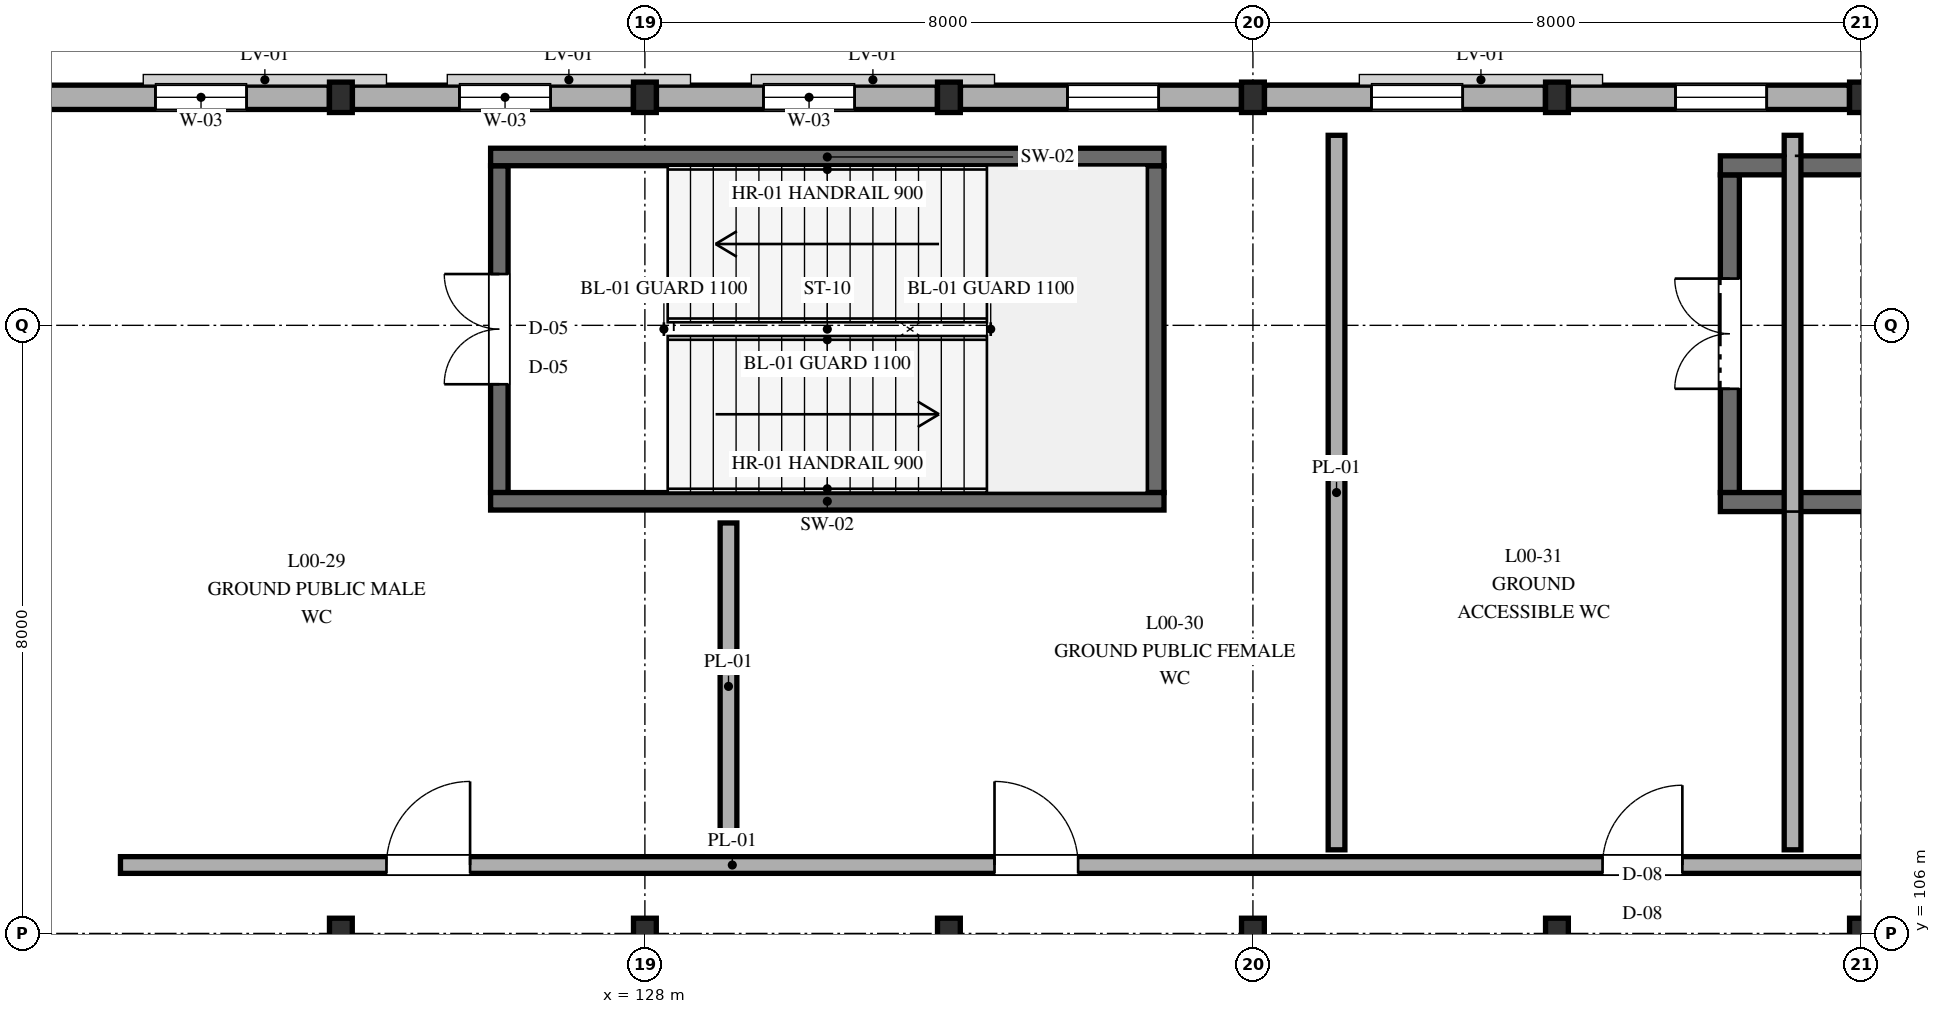
"""IFC4 building model, lengths in metres.
Left out: names, types, materials, properties, quantities, classifications, styles, units other than length and angle.
Written with IfcOpenShell. Run it as: python <this file> out.ifc"""

import sys

from ifc_helpers import new_model, si_unit, direction, frame, frame_2d, origin, origin_2d, place, context, subcontext, project, spatial, rectangle, i_section, extrude, element, fill, save


model = new_model("IFC4")
c1 = context("Model", 3, precision=1e-05, world=origin(), true_north=direction((0.0, 1.0)))
c2 = subcontext(c1, "Body", "Model", "MODEL_VIEW")
j1 = project(units=[si_unit("LENGTHUNIT", "METRE"), si_unit("PLANEANGLEUNIT", "RADIAN")], contexts=[c1])
p1 = place(None, origin())
s1 = spatial("IfcSite", under=j1, at=p1, CompositionType="ELEMENT")
p2 = place(p1, origin())
s2 = spatial("IfcBuilding", under=s1, at=p2, CompositionType="ELEMENT")
p3 = place(p2, origin())
s3 = spatial("IfcBuildingStorey", under=s2, at=p3, CompositionType="ELEMENT", Elevation=0.0)
for number, where, z_axis, x_axis in (
    (1, (124.0, 106.0, 0.0), (0.0, 0.0, 1.0), (1.0, 0.0, 0.0)),
    (2, (124.0, 117.0, 0.0), (0.0, 0.0, 1.0), (1.0, 0.0, 0.0)),
    (3, (128.0, 106.0, 0.0), (0.0, 0.0, 1.0), (1.0, 0.0, 0.0)),
    (4, (128.0, 117.0, 0.0), (0.0, 0.0, 1.0), (1.0, 0.0, 0.0)),
    (5, (132.0, 106.0, 0.0), (0.0, 0.0, 1.0), (1.0, 0.0, 0.0)),
    (6, (132.0, 117.0, 0.0), (0.0, 0.0, 1.0), (1.0, 0.0, 0.0)),
    (7, (136.0, 106.0, 0.0), (0.0, 0.0, 1.0), (1.0, 0.0, 0.0)),
    (8, (136.0, 117.0, 0.0), (0.0, 0.0, 1.0), (1.0, 0.0, 0.0)),
    (9, (140.0, 106.0, 0.0), (0.0, 0.0, 1.0), (1.0, 0.0, 0.0)),
    (10, (140.0, 117.0, 0.0), (0.0, 0.0, 1.0), (1.0, 0.0, 0.0)),
    (11, (144.0, 106.0, 0.0), (0.0, 0.0, 1.0), (1.0, 0.0, 0.0)),
    (12, (144.0, 117.0, 0.0), (0.0, 0.0, 1.0), (1.0, 0.0, 0.0)),
):
    element("IfcColumn", number, at=place(p3, frame(where, z_axis=z_axis, x_axis=x_axis)), inside=s3, PredefinedType="COLUMN", context=c2, shape_type="SweptSolid", body=[
        extrude(i_section(OverallWidth=0.3, OverallDepth=0.4, WebThickness=0.013, FlangeThickness=0.024, FilletRadius=0.027, at=origin_2d()), origin(), (0.0, 0.0, 1.0), 4.8),
    ])
p4 = place(p3, frame((123.848, 117.0, 0.0), z_axis=(0.0, 0.0, 1.0), x_axis=(-1.0, 0.0, 0.0)))
e13 = element("IfcWall", 13, at=p4, inside=s3, PredefinedType="STANDARD", context=c2, shape_type="SweptSolid", body=[
    extrude(rectangle(XDim=3.696, YDim=0.32, at=frame_2d((1.848, 0.0))), origin(), (0.0, 0.0, 1.0), 4.255),
])
p5 = place(p4, frame((1.088, 0.0, 0.95)))
e14 = element("IfcOpeningElement", 14, at=p5, cuts=e13, PredefinedType="OPENING", context=c2, shape_type="SweptSolid", body=[
    extrude(rectangle(XDim=1.2, YDim=1.5, at=frame_2d((0.6, 0.75))), frame((0.0, 0.17, 0.0), z_axis=(0.0, -1.0, 0.0), x_axis=(1.0, 0.0, 0.0)), (0.0, 0.0, 1.0), 0.34),
])
p6 = place(p3, frame((127.848, 117.0, 0.0), z_axis=(0.0, 0.0, 1.0), x_axis=(-1.0, 0.0, 0.0)))
e15 = element("IfcWall", 15, at=p6, inside=s3, PredefinedType="STANDARD", context=c2, shape_type="SweptSolid", body=[
    extrude(rectangle(XDim=3.696, YDim=0.32, at=frame_2d((1.848, 0.0))), origin(), (0.0, 0.0, 1.0), 4.255),
])
p7 = place(p6, frame((1.088, 0.0, 0.95)))
e16 = element("IfcOpeningElement", 16, at=p7, cuts=e15, PredefinedType="OPENING", context=c2, shape_type="SweptSolid", body=[
    extrude(rectangle(XDim=1.2, YDim=1.5, at=frame_2d((0.6, 0.75))), frame((0.0, 0.17, 0.0), z_axis=(0.0, -1.0, 0.0), x_axis=(1.0, 0.0, 0.0)), (0.0, 0.0, 1.0), 0.34),
])
p8 = place(p3, frame((131.848, 117.0, 0.0), z_axis=(0.0, 0.0, 1.0), x_axis=(-1.0, 0.0, 0.0)))
e17 = element("IfcWall", 17, at=p8, inside=s3, PredefinedType="STANDARD", context=c2, shape_type="SweptSolid", body=[
    extrude(rectangle(XDim=3.696, YDim=0.32, at=frame_2d((1.848, 0.0))), origin(), (0.0, 0.0, 1.0), 4.255),
])
p9 = place(p8, frame((1.088, 0.0, 0.95)))
e18 = element("IfcOpeningElement", 18, at=p9, cuts=e17, PredefinedType="OPENING", context=c2, shape_type="SweptSolid", body=[
    extrude(rectangle(XDim=1.2, YDim=1.5, at=frame_2d((0.6, 0.75))), frame((0.0, 0.17, 0.0), z_axis=(0.0, -1.0, 0.0), x_axis=(1.0, 0.0, 0.0)), (0.0, 0.0, 1.0), 0.34),
])
p10 = place(p3, frame((135.848, 117.0, 0.0), z_axis=(0.0, 0.0, 1.0), x_axis=(-1.0, 0.0, 0.0)))
e19 = element("IfcWall", 19, at=p10, inside=s3, PredefinedType="STANDARD", context=c2, shape_type="SweptSolid", body=[
    extrude(rectangle(XDim=3.696, YDim=0.32, at=frame_2d((1.848, 0.0))), origin(), (0.0, 0.0, 1.0), 4.255),
])
p11 = place(p10, frame((1.088, 0.0, 0.95)))
e20 = element("IfcOpeningElement", 20, at=p11, cuts=e19, PredefinedType="OPENING", context=c2, shape_type="SweptSolid", body=[
    extrude(rectangle(XDim=1.2, YDim=1.5, at=frame_2d((0.6, 0.75))), frame((0.0, 0.17, 0.0), z_axis=(0.0, -1.0, 0.0), x_axis=(1.0, 0.0, 0.0)), (0.0, 0.0, 1.0), 0.34),
])
p12 = place(p3, frame((139.848, 117.0, 0.0), z_axis=(0.0, 0.0, 1.0), x_axis=(-1.0, 0.0, 0.0)))
e21 = element("IfcWall", 21, at=p12, inside=s3, PredefinedType="STANDARD", context=c2, shape_type="SweptSolid", body=[
    extrude(rectangle(XDim=3.696, YDim=0.32, at=frame_2d((1.848, 0.0))), origin(), (0.0, 0.0, 1.0), 4.255),
])
p13 = place(p12, frame((1.088, 0.0, 0.95)))
e22 = element("IfcOpeningElement", 22, at=p13, cuts=e21, PredefinedType="OPENING", context=c2, shape_type="SweptSolid", body=[
    extrude(rectangle(XDim=1.2, YDim=1.5, at=frame_2d((0.6, 0.75))), frame((0.0, 0.17, 0.0), z_axis=(0.0, -1.0, 0.0), x_axis=(1.0, 0.0, 0.0)), (0.0, 0.0, 1.0), 0.34),
])
p14 = place(p3, frame((143.848, 117.0, 0.0), z_axis=(0.0, 0.0, 1.0), x_axis=(-1.0, 0.0, 0.0)))
e23 = element("IfcWall", 23, at=p14, inside=s3, PredefinedType="STANDARD", context=c2, shape_type="SweptSolid", body=[
    extrude(rectangle(XDim=3.696, YDim=0.32, at=frame_2d((1.848, 0.0))), origin(), (0.0, 0.0, 1.0), 4.255),
])
p15 = place(p14, frame((1.088, 0.0, 0.95)))
e24 = element("IfcOpeningElement", 24, at=p15, cuts=e23, PredefinedType="OPENING", context=c2, shape_type="SweptSolid", body=[
    extrude(rectangle(XDim=1.2, YDim=1.5, at=frame_2d((0.6, 0.75))), frame((0.0, 0.17, 0.0), z_axis=(0.0, -1.0, 0.0), x_axis=(1.0, 0.0, 0.0)), (0.0, 0.0, 1.0), 0.34),
])
p16 = place(p3, frame((142.275, 111.8, 0.0), z_axis=(0.0, 0.0, 1.0), x_axis=(0.0, 1.0, 0.0)))
e25 = element("IfcWall", 25, at=p16, inside=s3, PredefinedType="SHEAR", context=c2, shape_type="SweptSolid", body=[
    extrude(rectangle(XDim=4.18, YDim=0.25, at=frame_2d((2.09, 0.0))), origin(), (0.0, 0.0, 1.0), 4.8),
])
p17 = place(p16, frame((1.365, 0.0, 0.0)))
e26 = element("IfcOpeningElement", 26, at=p17, cuts=e25, PredefinedType="OPENING", context=c2, shape_type="SweptSolid", body=[
    extrude(rectangle(XDim=1.45, YDim=2.2, at=frame_2d((0.725, 1.1))), frame((0.0, 0.135, 0.0), z_axis=(0.0, -1.0, 0.0), x_axis=(1.0, 0.0, 0.0)), (0.0, 0.0, 1.0), 0.27),
])
for number, where, z_axis, x_axis in (
    (27, (142.15, 111.675, 0.0), (0.0, 0.0, 1.0), (1.0, 0.0, 0.0)),
    (28, (150.85, 116.105, 0.0), (0.0, 0.0, 1.0), (-1.0, 0.0, 0.0)),
):
    element("IfcWall", number, at=place(p3, frame(where, z_axis=z_axis, x_axis=x_axis)), inside=s3, PredefinedType="SHEAR", context=c2, shape_type="SweptSolid", body=[
        extrude(rectangle(XDim=8.7, YDim=0.25, at=frame_2d((4.35, 0.0))), origin(), (0.0, 0.0, 1.0), 4.8),
    ])
p18 = place(p3, frame((126.085, 111.8, 0.0), z_axis=(0.0, 0.0, 1.0), x_axis=(0.0, 1.0, 0.0)))
e29 = element("IfcWall", 29, at=p18, inside=s3, PredefinedType="SHEAR", context=c2, shape_type="SweptSolid", body=[
    extrude(rectangle(XDim=4.3, YDim=0.23, at=frame_2d((2.15, 0.0))), origin(), (0.0, 0.0, 1.0), 4.8),
])
p19 = place(p18, frame((1.425, 0.0, 0.0)))
e30 = element("IfcOpeningElement", 30, at=p19, cuts=e29, PredefinedType="OPENING", context=c2, shape_type="SweptSolid", body=[
    extrude(rectangle(XDim=1.45, YDim=2.2, at=frame_2d((0.725, 1.1))), frame((0.0, 0.125, 0.0), z_axis=(0.0, -1.0, 0.0), x_axis=(1.0, 0.0, 0.0)), (0.0, 0.0, 1.0), 0.25),
])
p20 = place(p3, frame((134.715, 116.1, 0.0), z_axis=(0.0, 0.0, 1.0), x_axis=(0.0, -1.0, 0.0)))
e31 = element("IfcWall", 31, at=p20, inside=s3, PredefinedType="SHEAR", context=c2, shape_type="SweptSolid", body=[
    extrude(rectangle(XDim=4.3, YDim=0.23, at=frame_2d((2.15, 0.0))), origin(), (0.0, 0.0, 1.0), 4.8),
])
for number, where, z_axis, x_axis in (
    (32, (125.97, 111.685, 0.0), (0.0, 0.0, 1.0), (1.0, 0.0, 0.0)),
    (33, (134.83, 116.215, 0.0), (0.0, 0.0, 1.0), (-1.0, 0.0, 0.0)),
):
    element("IfcWall", number, at=place(p3, frame(where, z_axis=z_axis, x_axis=x_axis)), inside=s3, PredefinedType="SHEAR", context=c2, shape_type="SweptSolid", body=[
        extrude(rectangle(XDim=8.86, YDim=0.23, at=frame_2d((4.43, 0.0))), origin(), (0.0, 0.0, 1.0), 4.8),
    ])
p21 = place(p3, frame((121.1, 106.9, 0.0), z_axis=(0.0, 0.0, 1.0), x_axis=(1.0, 0.0, 0.0)))
e34 = element("IfcWall", 34, at=p21, inside=s3, PredefinedType="PLUMBINGWALL", context=c2, shape_type="SweptSolid", body=[
    extrude(rectangle(XDim=28.8, YDim=0.22, at=frame_2d((14.4, 0.0))), origin(), (0.0, 0.0, 1.0), 4.05),
])
p22 = place(p21, frame((3.5, 0.0, 0.0)))
e35 = element("IfcOpeningElement", 35, at=p22, cuts=e34, PredefinedType="OPENING", context=c2, shape_type="SweptSolid", body=[
    extrude(rectangle(XDim=1.1, YDim=2.2, at=frame_2d((0.55, 1.1))), frame((0.0, 0.12, 0.0), z_axis=(0.0, -1.0, 0.0), x_axis=(1.0, 0.0, 0.0)), (0.0, 0.0, 1.0), 0.24),
])
p23 = place(p21, frame((11.5, 0.0, 0.0)))
e36 = element("IfcOpeningElement", 36, at=p23, cuts=e34, PredefinedType="OPENING", context=c2, shape_type="SweptSolid", body=[
    extrude(rectangle(XDim=1.1, YDim=2.2, at=frame_2d((0.55, 1.1))), frame((0.0, 0.12, 0.0), z_axis=(0.0, -1.0, 0.0), x_axis=(1.0, 0.0, 0.0)), (0.0, 0.0, 1.0), 0.24),
])
p24 = place(p21, frame((19.5, 0.0, 0.0)))
e37 = element("IfcOpeningElement", 37, at=p24, cuts=e34, PredefinedType="OPENING", context=c2, shape_type="SweptSolid", body=[
    extrude(rectangle(XDim=1.05, YDim=2.15, at=frame_2d((0.525, 1.075))), frame((0.0, 0.12, 0.0), z_axis=(0.0, -1.0, 0.0), x_axis=(1.0, 0.0, 0.0)), (0.0, 0.0, 1.0), 0.24),
])
p25 = place(p21, frame((24.5, 0.0, 0.0)))
e38 = element("IfcOpeningElement", 38, at=p25, cuts=e34, PredefinedType="OPENING", context=c2, shape_type="SweptSolid", body=[
    extrude(rectangle(XDim=1.0, YDim=2.15, at=frame_2d((0.5, 1.075))), frame((0.0, 0.12, 0.0), z_axis=(0.0, -1.0, 0.0), x_axis=(1.0, 0.0, 0.0)), (0.0, 0.0, 1.0), 0.24),
])
p26 = place(p3, frame((129.1, 107.1, 0.0), z_axis=(0.0, 0.0, 1.0), x_axis=(0.0, 1.0, 0.0)))
e39 = element("IfcWall", 39, at=p26, inside=s3, PredefinedType="PLUMBINGWALL", context=c2, shape_type="SweptSolid", body=[
    extrude(rectangle(XDim=4.3, YDim=0.22, at=frame_2d((2.15, 0.0))), origin(), (0.0, 0.0, 1.0), 4.05),
])
for number, where, z_axis, x_axis in (
    (40, (137.1, 107.1, 0.0), (0.0, 0.0, 1.0), (0.0, 1.0, 0.0)),
    (41, (143.1, 107.1, 0.0), (0.0, 0.0, 1.0), (0.0, 1.0, 0.0)),
):
    element("IfcWall", number, at=place(p3, frame(where, z_axis=z_axis, x_axis=x_axis)), inside=s3, PredefinedType="PLUMBINGWALL", context=c2, shape_type="SweptSolid", body=[
        extrude(rectangle(XDim=9.4, YDim=0.22, at=frame_2d((4.7, 0.0))), origin(), (0.0, 0.0, 1.0), 4.05),
    ])
p27 = place(p5, origin())
e42 = element("IfcWindow", 42, at=p27, inside=s3, PartitioningType="SINGLE_PANEL", PredefinedType="WINDOW", context=c2, shape_type="SweptSolid", body=[
    extrude(rectangle(XDim=1.2, YDim=1.5, at=frame_2d((0.6, 0.75))), frame((0.0, 0.03, 0.0), z_axis=(0.0, -1.0, 0.0), x_axis=(1.0, 0.0, 0.0)), (0.0, 0.0, 1.0), 0.06),
])
fill(e14, e42)
p28 = place(p7, origin())
e43 = element("IfcWindow", 43, at=p28, inside=s3, PartitioningType="SINGLE_PANEL", PredefinedType="WINDOW", context=c2, shape_type="SweptSolid", body=[
    extrude(rectangle(XDim=1.2, YDim=1.5, at=frame_2d((0.6, 0.75))), frame((0.0, 0.03, 0.0), z_axis=(0.0, -1.0, 0.0), x_axis=(1.0, 0.0, 0.0)), (0.0, 0.0, 1.0), 0.06),
])
fill(e16, e43)
p29 = place(p9, origin())
e44 = element("IfcWindow", 44, at=p29, inside=s3, PartitioningType="SINGLE_PANEL", PredefinedType="WINDOW", context=c2, shape_type="SweptSolid", body=[
    extrude(rectangle(XDim=1.2, YDim=1.5, at=frame_2d((0.6, 0.75))), frame((0.0, 0.03, 0.0), z_axis=(0.0, -1.0, 0.0), x_axis=(1.0, 0.0, 0.0)), (0.0, 0.0, 1.0), 0.06),
])
fill(e18, e44)
p30 = place(p11, origin())
e45 = element("IfcWindow", 45, at=p30, inside=s3, PartitioningType="SINGLE_PANEL", PredefinedType="WINDOW", context=c2, shape_type="SweptSolid", body=[
    extrude(rectangle(XDim=1.2, YDim=1.5, at=frame_2d((0.6, 0.75))), frame((0.0, 0.03, 0.0), z_axis=(0.0, -1.0, 0.0), x_axis=(1.0, 0.0, 0.0)), (0.0, 0.0, 1.0), 0.06),
])
fill(e20, e45)
p31 = place(p13, origin())
e46 = element("IfcWindow", 46, at=p31, inside=s3, PartitioningType="SINGLE_PANEL", PredefinedType="WINDOW", context=c2, shape_type="SweptSolid", body=[
    extrude(rectangle(XDim=1.2, YDim=1.5, at=frame_2d((0.6, 0.75))), frame((0.0, 0.03, 0.0), z_axis=(0.0, -1.0, 0.0), x_axis=(1.0, 0.0, 0.0)), (0.0, 0.0, 1.0), 0.06),
])
fill(e22, e46)
p32 = place(p15, origin())
e47 = element("IfcWindow", 47, at=p32, inside=s3, PartitioningType="SINGLE_PANEL", PredefinedType="WINDOW", context=c2, shape_type="SweptSolid", body=[
    extrude(rectangle(XDim=1.2, YDim=1.5, at=frame_2d((0.6, 0.75))), frame((0.0, 0.03, 0.0), z_axis=(0.0, -1.0, 0.0), x_axis=(1.0, 0.0, 0.0)), (0.0, 0.0, 1.0), 0.06),
])
fill(e24, e47)
p33 = place(p17, origin())
e48 = element("IfcDoor", 48, at=p33, inside=s3, OperationType="DOUBLE_DOOR_SINGLE_SWING", PredefinedType="DOOR", context=c2, shape_type="SweptSolid", body=[
    extrude(rectangle(XDim=1.45, YDim=2.2, at=frame_2d((0.725, 1.1))), frame((0.0, 0.025, 0.0), z_axis=(0.0, -1.0, 0.0), x_axis=(1.0, 0.0, 0.0)), (0.0, 0.0, 1.0), 0.05),
])
fill(e26, e48)
p34 = place(p19, origin())
e49 = element("IfcDoor", 49, at=p34, inside=s3, OperationType="DOUBLE_DOOR_SINGLE_SWING", PredefinedType="DOOR", context=c2, shape_type="SweptSolid", body=[
    extrude(rectangle(XDim=1.45, YDim=2.2, at=frame_2d((0.725, 1.1))), frame((0.0, 0.025, 0.0), z_axis=(0.0, -1.0, 0.0), x_axis=(1.0, 0.0, 0.0)), (0.0, 0.0, 1.0), 0.05),
])
fill(e30, e49)
p35 = place(p22, origin())
e50 = element("IfcDoor", 50, at=p35, inside=s3, OperationType="SINGLE_SWING_RIGHT", PredefinedType="DOOR", context=c2, shape_type="SweptSolid", body=[
    extrude(rectangle(XDim=1.1, YDim=2.2, at=frame_2d((0.55, 1.1))), frame((0.0, 0.025, 0.0), z_axis=(0.0, -1.0, 0.0), x_axis=(1.0, 0.0, 0.0)), (0.0, 0.0, 1.0), 0.05),
])
fill(e35, e50)
p36 = place(p23, origin())
e51 = element("IfcDoor", 51, at=p36, inside=s3, OperationType="SINGLE_SWING_LEFT", PredefinedType="DOOR", context=c2, shape_type="SweptSolid", body=[
    extrude(rectangle(XDim=1.1, YDim=2.2, at=frame_2d((0.55, 1.1))), frame((0.0, 0.025, 0.0), z_axis=(0.0, -1.0, 0.0), x_axis=(1.0, 0.0, 0.0)), (0.0, 0.0, 1.0), 0.05),
])
fill(e36, e51)
p37 = place(p24, origin())
e52 = element("IfcDoor", 52, at=p37, inside=s3, OperationType="SINGLE_SWING_RIGHT", PredefinedType="DOOR", context=c2, shape_type="SweptSolid", body=[
    extrude(rectangle(XDim=1.05, YDim=2.15, at=frame_2d((0.525, 1.075))), frame((0.0, 0.025, 0.0), z_axis=(0.0, -1.0, 0.0), x_axis=(1.0, 0.0, 0.0)), (0.0, 0.0, 1.0), 0.05),
])
fill(e37, e52)
save(model, sys.argv[1])
